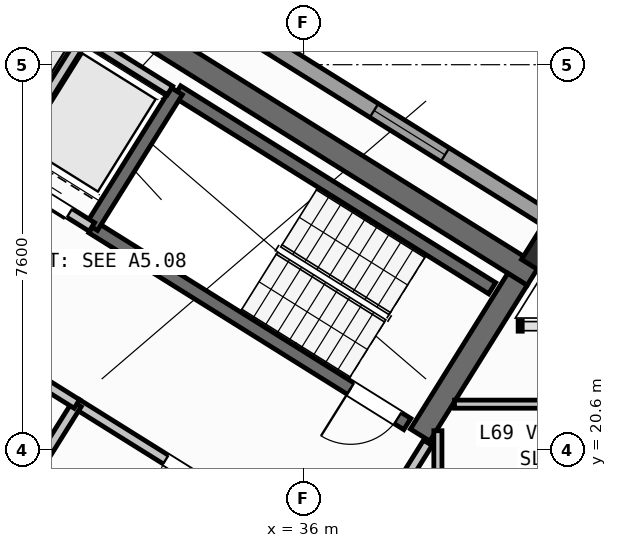
"""IFC4 building model, lengths in metres.
Left out: names, types, materials, properties, quantities, classifications, styles, units other than length and angle.
Written with IfcOpenShell. Run it as: python <this file> out.ifc"""

import sys

from ifc_helpers import new_model, si_unit, direction, frame, frame_2d, origin, origin_2d, place, context, subcontext, project, spatial, rectangle, hollow_rectangle, extrude, source, transform, mapped, element, fill, save


model = new_model("IFC4")
c1 = context("Model", 3, precision=1e-05, world=origin(), true_north=direction((0.0, 1.0)))
c2 = subcontext(c1, "Body", "Model", "MODEL_VIEW")
j1 = project(units=[si_unit("LENGTHUNIT", "METRE"), si_unit("PLANEANGLEUNIT", "RADIAN")], contexts=[c1])
p1 = place(None, origin())
s1 = spatial("IfcSite", under=j1, at=p1, CompositionType="ELEMENT")
p2 = place(p1, origin())
s2 = spatial("IfcBuilding", under=s1, at=p2, CompositionType="ELEMENT")
p3 = place(p2, frame((0.0, 0.0, 273.6)))
s3 = spatial("IfcBuildingStorey", under=s2, at=p3, CompositionType="ELEMENT", Elevation=273.6)
p4 = place(p3, frame((40.531, 24.036, 0.0), z_axis=(0.0, 0.0, 1.0), x_axis=(-0.848048787466, 0.529918157905, 0.0)))
e1 = element("IfcWall", 1, at=p4, inside=s3, PredefinedType="SHEAR", context=c2, shape_type="SweptSolid", body=[
    extrude(rectangle(XDim=13.04, YDim=0.45, at=frame_2d((6.52, 0.0))), origin(), (0.0, 0.0, 1.0), 3.35),
])
p5 = place(p3, frame((40.221, 23.965, 0.0), z_axis=(0.0, 0.0, 1.0), x_axis=(-0.529902075036, -0.848058836916, 0.0)))
e2 = element("IfcWall", 2, at=p5, inside=s3, PredefinedType="SHEAR", context=c2, shape_type="SweptSolid", body=[
    extrude(rectangle(XDim=3.625, YDim=0.45, at=frame_2d((1.812, 0.0))), origin(), (0.0, 0.0, 1.0), 3.35),
])
m1 = source(origin(), c2, "Body", "SweptSolid", [
    extrude(hollow_rectangle(XDim=0.7, YDim=0.7, WallThickness=0.028, at=origin_2d()), origin(), (0.0, 0.0, 1.0), 3.6),
])
p6 = place(p3, frame((40.783, 24.469, 0.0), z_axis=(0.0, 0.0, 1.0), x_axis=(-0.848048096156, 0.529919264233, 0.0)))
e3 = element("IfcColumn", 3, at=p6, inside=s3, PredefinedType="COLUMN", context=c2, shape_type="MappedRepresentation", body=[
    mapped(m1, transform((0.0, 0.0, 0.0), scale=1.0)),
])
p7 = place(p3, frame((14.138, 41.825, 0.0), z_axis=(0.0, 0.0, 1.0), x_axis=(0.848046498049, -0.529921821731, 0.0)))
e4 = element("IfcWall", 4, at=p7, inside=s3, PredefinedType="STANDARD", context=c2, shape_type="SweptSolid", body=[
    extrude(rectangle(XDim=31.588, YDim=0.32, at=frame_2d((15.794, 0.0))), origin(), (0.0, 0.0, 1.0), 3.35),
])
p8 = place(p7, frame((3.46, 0.0, 0.0)))
e5 = element("IfcOpeningElement", 5, at=p8, cuts=e4, PredefinedType="OPENING", context=c2, shape_type="SweptSolid", body=[
    extrude(rectangle(XDim=1.05, YDim=2.15, at=frame_2d((0.525, 1.075))), frame((0.0, 0.17, 0.0), z_axis=(0.0, -1.0, 0.0), x_axis=(1.0, 0.0, 0.0)), (0.0, 0.0, 1.0), 0.34),
])
p9 = place(p7, frame((0.831, 0.0, 1.0)))
e6 = element("IfcOpeningElement", 6, at=p9, cuts=e4, PredefinedType="OPENING", context=c2, shape_type="SweptSolid", body=[
    extrude(rectangle(XDim=0.9, YDim=1.25, at=frame_2d((0.45, 0.625))), frame((0.0, 0.17, 0.0), z_axis=(0.0, -1.0, 0.0), x_axis=(1.0, 0.0, 0.0)), (0.0, 0.0, 1.0), 0.34),
])
p10 = place(p7, frame((8.719, 0.0, 0.9)))
e7 = element("IfcOpeningElement", 7, at=p10, cuts=e4, PredefinedType="OPENING", context=c2, shape_type="SweptSolid", body=[
    extrude(rectangle(XDim=1.35, YDim=1.45, at=frame_2d((0.675, 0.725))), frame((0.0, 0.17, 0.0), z_axis=(0.0, -1.0, 0.0), x_axis=(1.0, 0.0, 0.0)), (0.0, 0.0, 1.0), 0.34),
])
p11 = place(p7, frame((13.599, 0.0, 0.95)))
e8 = element("IfcOpeningElement", 8, at=p11, cuts=e4, PredefinedType="OPENING", context=c2, shape_type="SweptSolid", body=[
    extrude(rectangle(XDim=1.95, YDim=1.35, at=frame_2d((0.975, 0.675))), frame((0.0, 0.17, 0.0), z_axis=(0.0, -1.0, 0.0), x_axis=(1.0, 0.0, 0.0)), (0.0, 0.0, 1.0), 0.34),
])
p12 = place(p7, frame((17.154, 0.0, 1.0)))
e9 = element("IfcOpeningElement", 9, at=p12, cuts=e4, PredefinedType="OPENING", context=c2, shape_type="SweptSolid", body=[
    extrude(rectangle(XDim=0.9, YDim=1.25, at=frame_2d((0.45, 0.625))), frame((0.0, 0.17, 0.0), z_axis=(0.0, -1.0, 0.0), x_axis=(1.0, 0.0, 0.0)), (0.0, 0.0, 1.0), 0.34),
])
p13 = place(p7, frame((21.719, 0.0, 0.9)))
e10 = element("IfcOpeningElement", 10, at=p13, cuts=e4, PredefinedType="OPENING", context=c2, shape_type="SweptSolid", body=[
    extrude(rectangle(XDim=1.65, YDim=1.45, at=frame_2d((0.825, 0.725))), frame((0.0, 0.17, 0.0), z_axis=(0.0, -1.0, 0.0), x_axis=(1.0, 0.0, 0.0)), (0.0, 0.0, 1.0), 0.34),
])
p14 = place(p7, frame((27.419, 0.0, 0.9)))
e11 = element("IfcOpeningElement", 11, at=p14, cuts=e4, PredefinedType="OPENING", context=c2, shape_type="SweptSolid", body=[
    extrude(rectangle(XDim=1.65, YDim=1.45, at=frame_2d((0.825, 0.725))), frame((0.0, 0.17, 0.0), z_axis=(0.0, -1.0, 0.0), x_axis=(1.0, 0.0, 0.0)), (0.0, 0.0, 1.0), 0.34),
])
p15 = place(p3, frame((31.28, 18.261, 0.0), z_axis=(0.0, 0.0, 1.0), x_axis=(-0.848051618787, 0.529913626805, 0.0)))
e12 = element("IfcWall", 12, at=p15, inside=s3, PredefinedType="SHEAR", context=c2, shape_type="SweptSolid", body=[
    extrude(rectangle(XDim=7.46, YDim=0.26, at=frame_2d((3.73, 0.0))), origin(), (0.0, 0.0, 1.0), 3.35),
])
p16 = place(p15, frame((0.36, 0.0, 0.0)))
e13 = element("IfcOpeningElement", 13, at=p16, cuts=e12, PredefinedType="OPENING", context=c2, shape_type="SweptSolid", body=[
    extrude(rectangle(XDim=0.86, YDim=2.05, at=frame_2d((0.43, 1.025))), frame((0.0, 0.14, 0.0), z_axis=(0.0, -1.0, 0.0), x_axis=(1.0, 0.0, 0.0)), (0.0, 0.0, 1.0), 0.28),
])
p17 = place(p3, frame((39.721, 23.788, 0.0), z_axis=(0.0, 0.0, 1.0), x_axis=(-0.848054434086, 0.529909121291, 0.0)))
e14 = element("IfcWall", 14, at=p17, inside=s3, PredefinedType="SHEAR", context=c2, shape_type="SweptSolid", body=[
    extrude(rectangle(XDim=7.33, YDim=0.26, at=frame_2d((3.665, 0.0))), origin(), (0.0, 0.0, 1.0), 3.35),
])
p18 = place(p3, frame((38.046, 21.108, 0.0), z_axis=(0.0, 0.0, 1.0), x_axis=(-0.848054434086, 0.529909121291, 0.0)))
e15 = element("IfcWall", 15, at=p18, inside=s3, PredefinedType="SHEAR", context=c2, shape_type="SweptSolid", body=[
    extrude(rectangle(XDim=7.33, YDim=0.26, at=frame_2d((3.665, 0.0))), origin(), (0.0, 0.0, 1.0), 3.35),
])
p19 = place(p18, frame((0.22, 0.0, 0.0)))
e16 = element("IfcOpeningElement", 16, at=p19, cuts=e15, PredefinedType="OPENING", context=c2, shape_type="SweptSolid", body=[
    extrude(rectangle(XDim=1.1, YDim=2.1, at=frame_2d((0.55, 1.05))), frame((0.0, 0.14, 0.0), z_axis=(0.0, -1.0, 0.0), x_axis=(1.0, 0.0, 0.0)), (0.0, 0.0, 1.0), 0.28),
])
p20 = place(p3, frame((33.496, 27.677, 0.0), z_axis=(0.0, 0.0, 1.0), x_axis=(-0.529908658664, -0.84805472316, 0.0)))
e17 = element("IfcWall", 17, at=p20, inside=s3, PredefinedType="SHEAR", context=c2, shape_type="SweptSolid", body=[
    extrude(rectangle(XDim=3.16, YDim=0.26, at=frame_2d((1.58, 0.0))), origin(), (0.0, 0.0, 1.0), 3.35),
])
p21 = place(p3, frame((36.459, 18.421, 0.0), z_axis=(0.0, 0.0, 1.0), x_axis=(-0.848059591691, 0.529900867089, 0.0)))
e18 = element("IfcWall", 18, at=p21, inside=s3, PredefinedType="STANDARD", context=c2, shape_type="SweptSolid", body=[
    extrude(rectangle(XDim=5.818, YDim=0.2, at=frame_2d((2.909, 0.0))), origin(), (0.0, 0.0, 1.0), 3.34),
])
p22 = place(p21, frame((2.598, 0.0, 0.0)))
e19 = element("IfcOpeningElement", 19, at=p22, cuts=e18, PredefinedType="OPENING", context=c2, shape_type="SweptSolid", body=[
    extrude(rectangle(XDim=1.15, YDim=2.1, at=frame_2d((0.575, 1.05))), frame((0.0, 0.11, 0.0), z_axis=(0.0, -1.0, 0.0), x_axis=(1.0, 0.0, 0.0)), (0.0, 0.0, 1.0), 0.22),
])
p23 = place(p3, frame((31.822, 24.998, 0.0), z_axis=(0.0, 0.0, 1.0), x_axis=(-0.848054125777, 0.529909614701, 0.0)))
e20 = element("IfcWall", 20, at=p23, inside=s3, PredefinedType="STANDARD", context=c2, shape_type="SweptSolid", body=[
    extrude(rectangle(XDim=4.668, YDim=0.2, at=frame_2d((2.334, 0.0))), origin(), (0.0, 0.0, 1.0), 3.34),
])
p24 = place(p23, frame((0.52, 0.0, 0.0)))
e21 = element("IfcOpeningElement", 21, at=p24, cuts=e20, PredefinedType="OPENING", context=c2, shape_type="SweptSolid", body=[
    extrude(rectangle(XDim=1.2, YDim=2.15, at=frame_2d((0.6, 1.075))), frame((0.0, 0.11, 0.0), z_axis=(0.0, -1.0, 0.0), x_axis=(1.0, 0.0, 0.0)), (0.0, 0.0, 1.0), 0.22),
])
p25 = place(p23, frame((2.54, 0.0, 0.0)))
e22 = element("IfcOpeningElement", 22, at=p25, cuts=e20, PredefinedType="OPENING", context=c2, shape_type="SweptSolid", body=[
    extrude(rectangle(XDim=1.2, YDim=2.15, at=frame_2d((0.6, 1.075))), frame((0.0, 0.11, 0.0), z_axis=(0.0, -1.0, 0.0), x_axis=(1.0, 0.0, 0.0)), (0.0, 0.0, 1.0), 0.22),
])
p26 = place(p3, frame((31.645, 28.716, 0.0), z_axis=(0.0, 0.0, 1.0), x_axis=(-0.52986693015, -0.848080795876, 0.0)))
e23 = element("IfcWall", 23, at=p26, inside=s3, PredefinedType="STANDARD", context=c2, shape_type="SweptSolid", body=[
    extrude(rectangle(XDim=2.66, YDim=0.2, at=frame_2d((1.33, 0.0))), origin(), (0.0, 0.0, 1.0), 3.34),
])
p27 = place(p3, frame((33.363, 27.69, 0.0), z_axis=(0.0, 0.0, 1.0), x_axis=(-0.84804957148, 0.529916903215, 0.0)))
e24 = element("IfcWall", 24, at=p27, inside=s3, PredefinedType="STANDARD", context=c2, shape_type="SweptSolid", body=[
    extrude(rectangle(XDim=4.548, YDim=0.2, at=frame_2d((2.274, 0.0))), origin(), (0.0, 0.0, 1.0), 3.34),
])
p28 = place(p3, frame((31.525, 21.504, 0.0), z_axis=(0.0, 0.0, 1.0), x_axis=(-0.529907497854, -0.848055448493, 0.0)))
e25 = element("IfcWall", 25, at=p28, inside=s3, PredefinedType="STANDARD", context=c2, shape_type="SweptSolid", body=[
    extrude(rectangle(XDim=2.88, YDim=0.2, at=frame_2d((1.44, 0.0))), origin(), (0.0, 0.0, 1.0), 3.34),
])
p29 = place(p3, frame((31.525, 21.504, 0.0), z_axis=(0.0, 0.0, 1.0), x_axis=(-0.848042066329, 0.529928913853, 0.0)))
e26 = element("IfcWall", 26, at=p29, inside=s3, PredefinedType="STANDARD", context=c2, shape_type="SweptSolid", body=[
    extrude(rectangle(XDim=6.268, YDim=0.2, at=frame_2d((3.134, 0.0))), origin(), (0.0, 0.0, 1.0), 3.34),
])
p30 = place(p29, frame((4.4, 0.0, 0.0)))
e27 = element("IfcOpeningElement", 27, at=p30, cuts=e26, PredefinedType="OPENING", context=c2, shape_type="SweptSolid", body=[
    extrude(rectangle(XDim=0.86, YDim=2.05, at=frame_2d((0.43, 1.025))), frame((0.0, 0.11, 0.0), z_axis=(0.0, -1.0, 0.0), x_axis=(1.0, 0.0, 0.0)), (0.0, 0.0, 1.0), 0.22),
])
p31 = place(p29, frame((1.45, 0.0, 0.0)))
e28 = element("IfcOpeningElement", 28, at=p31, cuts=e26, PredefinedType="OPENING", context=c2, shape_type="SweptSolid", body=[
    extrude(rectangle(XDim=0.86, YDim=2.05, at=frame_2d((0.43, 1.025))), frame((0.0, 0.11, 0.0), z_axis=(0.0, -1.0, 0.0), x_axis=(1.0, 0.0, 0.0)), (0.0, 0.0, 1.0), 0.22),
])
p32 = place(p3, frame((38.451, 20.737, 0.0), z_axis=(0.0, 0.0, 1.0), x_axis=(-0.529924799939, -0.848044637038, 0.0)))
e29 = element("IfcWall", 29, at=p32, inside=s3, PredefinedType="STANDARD", context=c2, shape_type="SweptSolid", body=[
    extrude(rectangle(XDim=2.96, YDim=0.2, at=frame_2d((1.48, 0.0))), origin(), (0.0, 0.0, 1.0), 3.34),
])
p33 = place(p32, frame((1.46, 0.0, 0.0)))
e30 = element("IfcOpeningElement", 30, at=p33, cuts=e29, PredefinedType="OPENING", context=c2, shape_type="SweptSolid", body=[
    extrude(rectangle(XDim=0.86, YDim=2.05, at=frame_2d((0.43, 1.025))), frame((0.0, 0.11, 0.0), z_axis=(0.0, -1.0, 0.0), x_axis=(1.0, 0.0, 0.0)), (0.0, 0.0, 1.0), 0.22),
])
p34 = place(p3, frame((38.65, 17.93, 0.0), z_axis=(0.0, 0.0, 1.0), x_axis=(0.0, 1.0, 0.0)))
e31 = element("IfcWall", 31, at=p34, inside=s3, PredefinedType="PARTITIONING", context=c2, shape_type="SweptSolid", body=[
    extrude(rectangle(XDim=3.046, YDim=0.16, at=frame_2d((1.523, 0.0))), origin(), (0.0, 0.0, 1.0), 3.34),
])
p35 = place(p3, frame((38.978, 21.5, 0.0), z_axis=(0.0, 0.0, 1.0), x_axis=(1.0, 0.0, 0.0)))
e32 = element("IfcWall", 32, at=p35, inside=s3, PredefinedType="PARTITIONING", context=c2, shape_type="SweptSolid", body=[
    extrude(rectangle(XDim=3.823, YDim=0.16, at=frame_2d((1.911, 0.0))), origin(), (0.0, 0.0, 1.0), 3.34),
])
m2 = source(origin(), c2, "Body", "SweptSolid", [
    extrude(rectangle(XDim=1.65, YDim=1.45, at=frame_2d((0.825, 0.725))), frame((0.0, 0.03, 0.0), z_axis=(0.0, -1.0, 0.0), x_axis=(1.0, 0.0, 0.0)), (0.0, 0.0, 1.0), 0.06),
])
p36 = place(p14, origin())
e33 = element("IfcWindow", 33, at=p36, inside=s3, PartitioningType="SINGLE_PANEL", PredefinedType="WINDOW", context=c2, shape_type="MappedRepresentation", body=[
    mapped(m2, transform((0.0, 0.0, 0.0), scale=1.0)),
])
fill(e11, e33)
m3 = source(origin(), c2, "Body", "SweptSolid", [
    extrude(rectangle(XDim=1.1, YDim=2.1, at=frame_2d((0.55, 1.05))), frame((0.0, 0.025, 0.0), z_axis=(0.0, -1.0, 0.0), x_axis=(1.0, 0.0, 0.0)), (0.0, 0.0, 1.0), 0.05),
])
p37 = place(p19, origin())
e34 = element("IfcDoor", 34, at=p37, inside=s3, OperationType="SINGLE_SWING_RIGHT", PredefinedType="DOOR", context=c2, shape_type="MappedRepresentation", body=[
    mapped(m3, transform((0.0, 0.0, 0.0), scale=1.0)),
])
fill(e16, e34)
m4 = source(origin(), c2, "Body", "SweptSolid", [
    extrude(rectangle(XDim=1.15, YDim=2.1, at=frame_2d((0.575, 1.05))), frame((0.0, 0.025, 0.0), z_axis=(0.0, -1.0, 0.0), x_axis=(1.0, 0.0, 0.0)), (0.0, 0.0, 1.0), 0.05),
])
p38 = place(p22, origin())
e35 = element("IfcDoor", 35, at=p38, inside=s3, OperationType="SINGLE_SWING_LEFT", PredefinedType="DOOR", context=c2, shape_type="MappedRepresentation", body=[
    mapped(m4, transform((0.0, 0.0, 0.0), scale=1.0)),
])
fill(e19, e35)
m5 = source(origin(), c2, "Body", "SweptSolid", [
    extrude(rectangle(XDim=1.2, YDim=2.15, at=frame_2d((0.6, 1.075))), frame((0.0, 0.025, 0.0), z_axis=(0.0, -1.0, 0.0), x_axis=(1.0, 0.0, 0.0)), (0.0, 0.0, 1.0), 0.05),
])
p39 = place(p24, origin())
e36 = element("IfcDoor", 36, at=p39, inside=s3, OperationType="DOUBLE_DOOR_SLIDING", PredefinedType="DOOR", context=c2, shape_type="MappedRepresentation", body=[
    mapped(m5, transform((0.0, 0.0, 0.0), scale=1.0)),
])
fill(e21, e36)
save(model, sys.argv[1])
